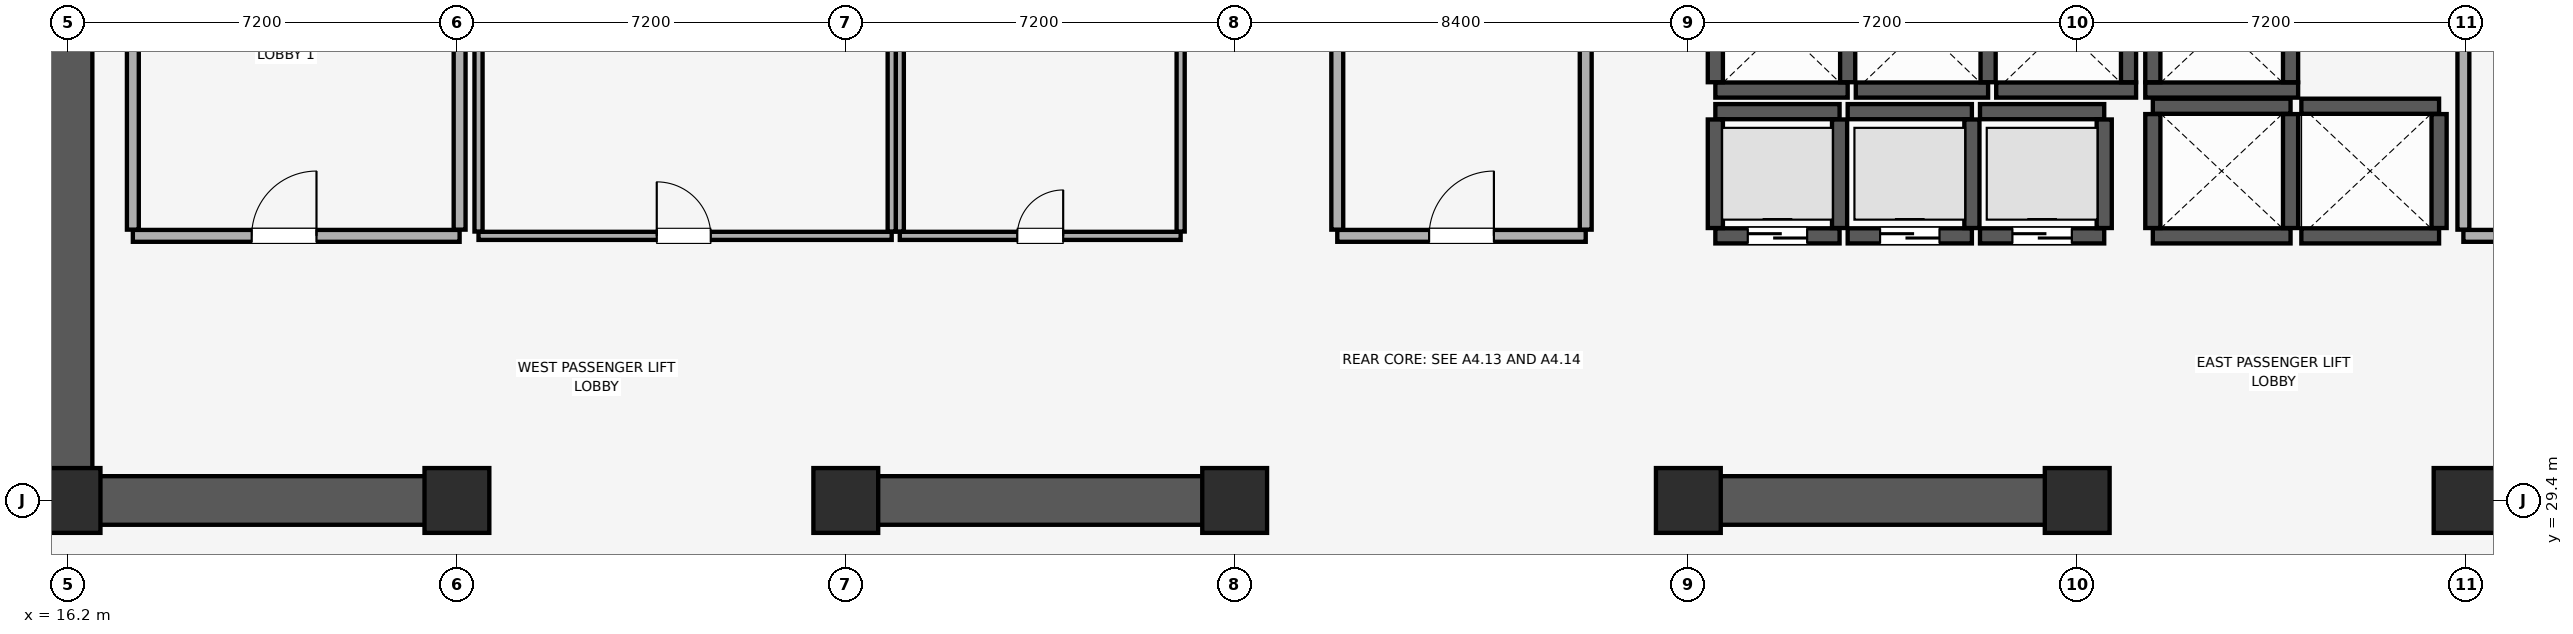
"""IFC4 building model, lengths in metres.
Left out: names, types, materials, properties, quantities, classifications, styles, units other than length and angle.
Written with IfcOpenShell. Run it as: python <this file> out.ifc"""

import sys

from ifc_helpers import new_model, si_unit, direction, frame, frame_2d, origin, origin_2d, place, context, subcontext, project, spatial, rectangle, extrude, element, fill, save


model = new_model("IFC4")
c1 = context("Model", 3, precision=1e-05, world=origin(), true_north=direction((0.0, 1.0)))
c2 = subcontext(c1, "Body", "Model", "MODEL_VIEW")
j1 = project(units=[si_unit("LENGTHUNIT", "METRE"), si_unit("PLANEANGLEUNIT", "RADIAN")], contexts=[c1])
p1 = place(None, origin())
s1 = spatial("IfcSite", under=j1, at=p1, CompositionType="ELEMENT")
p2 = place(p1, origin())
s2 = spatial("IfcBuilding", under=s1, at=p2, CompositionType="ELEMENT")
p3 = place(p2, frame((0.0, 0.0, 184.75)))
s3 = spatial("IfcBuildingStorey", under=s2, at=p3, CompositionType="ELEMENT", Elevation=184.75)
for number, where, z_axis, x_axis in (
    (1, (16.2, 29.4, 0.0), (0.0, 0.0, 1.0), (1.0, 0.0, 0.0)),
    (2, (23.4, 29.4, 0.0), (0.0, 0.0, 1.0), (1.0, 0.0, 0.0)),
    (3, (30.6, 29.4, 0.0), (0.0, 0.0, 1.0), (1.0, 0.0, 0.0)),
    (4, (37.8, 29.4, 0.0), (0.0, 0.0, 1.0), (1.0, 0.0, 0.0)),
    (5, (46.2, 29.4, 0.0), (0.0, 0.0, 1.0), (1.0, 0.0, 0.0)),
    (6, (53.4, 29.4, 0.0), (0.0, 0.0, 1.0), (1.0, 0.0, 0.0)),
    (7, (60.6, 29.4, 0.0), (0.0, 0.0, 1.0), (1.0, 0.0, 0.0)),
):
    element("IfcColumn", number, at=place(p3, frame(where, z_axis=z_axis, x_axis=x_axis)), inside=s3, PredefinedType="COLUMN", context=c2, shape_type="SweptSolid", body=[
        extrude(rectangle(XDim=1.2, YDim=1.2, at=origin_2d()), origin(), (0.0, 0.0, 1.0), 5.16),
    ])
p4 = place(p3, frame((16.2, 29.4, 0.0), z_axis=(0.0, 0.0, 1.0), x_axis=(0.0, 1.0, 0.0)))
e8 = element("IfcWall", 8, at=p4, inside=s3, PredefinedType="SHEAR", context=c2, shape_type="SweptSolid", body=[
    extrude(rectangle(XDim=19.2, YDim=0.9, at=frame_2d((9.6, 0.0))), origin(), (0.0, 0.0, 1.0), 5.16),
])
p5 = place(p3, frame((16.655, 29.4, 0.0), z_axis=(0.0, 0.0, 1.0), x_axis=(1.0, 0.0, 0.0)))
e9 = element("IfcWall", 9, at=p5, inside=s3, PredefinedType="SHEAR", context=c2, shape_type="SweptSolid", body=[
    extrude(rectangle(XDim=6.945, YDim=0.9, at=frame_2d((3.473, 0.0))), origin(), (0.0, 0.0, 1.0), 5.16),
])
for number, where, z_axis, x_axis in (
    (10, (30.4, 29.4, 0.0), (0.0, 0.0, 1.0), (1.0, 0.0, 0.0)),
    (11, (46.0, 29.4, 0.0), (0.0, 0.0, 1.0), (1.0, 0.0, 0.0)),
):
    element("IfcWall", number, at=place(p3, frame(where, z_axis=z_axis, x_axis=x_axis)), inside=s3, PredefinedType="SHEAR", context=c2, shape_type="SweptSolid", body=[
        extrude(rectangle(XDim=7.6, YDim=0.9, at=frame_2d((3.8, 0.0))), origin(), (0.0, 0.0, 1.0), 5.16),
    ])
p6 = place(p3, frame((60.4, 29.4, 0.0), z_axis=(0.0, 0.0, 1.0), x_axis=(1.0, 0.0, 0.0)))
e12 = element("IfcWall", 12, at=p6, inside=s3, PredefinedType="SHEAR", context=c2, shape_type="SweptSolid", body=[
    extrude(rectangle(XDim=6.945, YDim=0.9, at=frame_2d((3.473, 0.0))), origin(), (0.0, 0.0, 1.0), 5.16),
])
p7 = place(p3, frame((46.7, 34.3, 0.0), z_axis=(0.0, 0.0, 1.0), x_axis=(1.0, 0.0, 0.0)))
e13 = element("IfcWall", 13, at=p7, inside=s3, PredefinedType="SHEAR", context=c2, shape_type="SweptSolid", body=[
    extrude(rectangle(XDim=2.3, YDim=0.28, at=frame_2d((1.15, 0.0))), origin(), (0.0, 0.0, 1.0), 5.16),
])
p8 = place(p7, frame((0.6, 0.0, 0.0)))
e14 = element("IfcOpeningElement", 14, at=p8, cuts=e13, PredefinedType="OPENING", context=c2, shape_type="SweptSolid", body=[
    extrude(rectangle(XDim=1.1, YDim=2.2, at=frame_2d((0.55, 1.1))), frame((0.0, 0.15, 0.0), z_axis=(0.0, -1.0, 0.0), x_axis=(1.0, 0.0, 0.0)), (0.0, 0.0, 1.0), 0.3),
])
p9 = place(p3, frame((46.7, 36.6, 0.0), z_axis=(0.0, 0.0, 1.0), x_axis=(1.0, 0.0, 0.0)))
e15 = element("IfcWall", 15, at=p9, inside=s3, PredefinedType="SHEAR", context=c2, shape_type="SweptSolid", body=[
    extrude(rectangle(XDim=2.3, YDim=0.28, at=frame_2d((1.15, 0.0))), origin(), (0.0, 0.0, 1.0), 5.16),
])
for number, where, z_axis, x_axis in (
    (16, (46.7, 34.445, 0.0), (0.0, 0.0, 1.0), (0.0, 1.0, 0.0)),
    (17, (49.0, 34.445, 0.0), (0.0, 0.0, 1.0), (0.0, 1.0, 0.0)),
):
    element("IfcWall", number, at=place(p3, frame(where, z_axis=z_axis, x_axis=x_axis)), inside=s3, PredefinedType="SHEAR", context=c2, shape_type="SweptSolid", body=[
        extrude(rectangle(XDim=2.01, YDim=0.28, at=frame_2d((1.005, 0.0))), origin(), (0.0, 0.0, 1.0), 5.16),
    ])
p10 = place(p3, frame((49.15, 34.3, 0.0), z_axis=(0.0, 0.0, 1.0), x_axis=(1.0, 0.0, 0.0)))
e18 = element("IfcWall", 18, at=p10, inside=s3, PredefinedType="SHEAR", context=c2, shape_type="SweptSolid", body=[
    extrude(rectangle(XDim=2.3, YDim=0.28, at=frame_2d((1.15, 0.0))), origin(), (0.0, 0.0, 1.0), 5.16),
])
p11 = place(p10, frame((0.6, 0.0, 0.0)))
e19 = element("IfcOpeningElement", 19, at=p11, cuts=e18, PredefinedType="OPENING", context=c2, shape_type="SweptSolid", body=[
    extrude(rectangle(XDim=1.1, YDim=2.2, at=frame_2d((0.55, 1.1))), frame((0.0, 0.15, 0.0), z_axis=(0.0, -1.0, 0.0), x_axis=(1.0, 0.0, 0.0)), (0.0, 0.0, 1.0), 0.3),
])
p12 = place(p3, frame((49.15, 36.6, 0.0), z_axis=(0.0, 0.0, 1.0), x_axis=(1.0, 0.0, 0.0)))
e20 = element("IfcWall", 20, at=p12, inside=s3, PredefinedType="SHEAR", context=c2, shape_type="SweptSolid", body=[
    extrude(rectangle(XDim=2.3, YDim=0.28, at=frame_2d((1.15, 0.0))), origin(), (0.0, 0.0, 1.0), 5.16),
])
p13 = place(p3, frame((51.45, 34.445, 0.0), z_axis=(0.0, 0.0, 1.0), x_axis=(0.0, 1.0, 0.0)))
e21 = element("IfcWall", 21, at=p13, inside=s3, PredefinedType="SHEAR", context=c2, shape_type="SweptSolid", body=[
    extrude(rectangle(XDim=2.01, YDim=0.28, at=frame_2d((1.005, 0.0))), origin(), (0.0, 0.0, 1.0), 5.16),
])
p14 = place(p3, frame((51.6, 34.3, 0.0), z_axis=(0.0, 0.0, 1.0), x_axis=(1.0, 0.0, 0.0)))
e22 = element("IfcWall", 22, at=p14, inside=s3, PredefinedType="SHEAR", context=c2, shape_type="SweptSolid", body=[
    extrude(rectangle(XDim=2.3, YDim=0.28, at=frame_2d((1.15, 0.0))), origin(), (0.0, 0.0, 1.0), 5.16),
])
p15 = place(p14, frame((0.6, 0.0, 0.0)))
e23 = element("IfcOpeningElement", 23, at=p15, cuts=e22, PredefinedType="OPENING", context=c2, shape_type="SweptSolid", body=[
    extrude(rectangle(XDim=1.1, YDim=2.2, at=frame_2d((0.55, 1.1))), frame((0.0, 0.15, 0.0), z_axis=(0.0, -1.0, 0.0), x_axis=(1.0, 0.0, 0.0)), (0.0, 0.0, 1.0), 0.3),
])
p16 = place(p3, frame((51.6, 36.6, 0.0), z_axis=(0.0, 0.0, 1.0), x_axis=(1.0, 0.0, 0.0)))
e24 = element("IfcWall", 24, at=p16, inside=s3, PredefinedType="SHEAR", context=c2, shape_type="SweptSolid", body=[
    extrude(rectangle(XDim=2.3, YDim=0.28, at=frame_2d((1.15, 0.0))), origin(), (0.0, 0.0, 1.0), 5.16),
])
p17 = place(p3, frame((53.9, 34.445, 0.0), z_axis=(0.0, 0.0, 1.0), x_axis=(0.0, 1.0, 0.0)))
e25 = element("IfcWall", 25, at=p17, inside=s3, PredefinedType="SHEAR", context=c2, shape_type="SweptSolid", body=[
    extrude(rectangle(XDim=2.01, YDim=0.28, at=frame_2d((1.005, 0.0))), origin(), (0.0, 0.0, 1.0), 5.16),
])
p18 = place(p3, frame((46.7, 37.0, 0.0), z_axis=(0.0, 0.0, 1.0), x_axis=(1.0, 0.0, 0.0)))
e26 = element("IfcWall", 26, at=p18, inside=s3, PredefinedType="SHEAR", context=c2, shape_type="SweptSolid", body=[
    extrude(rectangle(XDim=2.45, YDim=0.28, at=frame_2d((1.225, 0.0))), origin(), (0.0, 0.0, 1.0), 5.16),
])
for number, where, z_axis, x_axis in (
    (27, (46.7, 37.145, 0.0), (0.0, 0.0, 1.0), (0.0, 1.0, 0.0)),
    (28, (49.15, 37.145, 0.0), (0.0, 0.0, 1.0), (0.0, 1.0, 0.0)),
):
    element("IfcWall", number, at=place(p3, frame(where, z_axis=z_axis, x_axis=x_axis)), inside=s3, PredefinedType="SHEAR", context=c2, shape_type="SweptSolid", body=[
        extrude(rectangle(XDim=2.06, YDim=0.28, at=frame_2d((1.03, 0.0))), origin(), (0.0, 0.0, 1.0), 5.16),
    ])
p19 = place(p3, frame((49.3, 37.0, 0.0), z_axis=(0.0, 0.0, 1.0), x_axis=(1.0, 0.0, 0.0)))
e29 = element("IfcWall", 29, at=p19, inside=s3, PredefinedType="SHEAR", context=c2, shape_type="SweptSolid", body=[
    extrude(rectangle(XDim=2.45, YDim=0.28, at=frame_2d((1.225, 0.0))), origin(), (0.0, 0.0, 1.0), 5.16),
])
p20 = place(p3, frame((51.75, 37.145, 0.0), z_axis=(0.0, 0.0, 1.0), x_axis=(0.0, 1.0, 0.0)))
e30 = element("IfcWall", 30, at=p20, inside=s3, PredefinedType="SHEAR", context=c2, shape_type="SweptSolid", body=[
    extrude(rectangle(XDim=2.06, YDim=0.28, at=frame_2d((1.03, 0.0))), origin(), (0.0, 0.0, 1.0), 5.16),
])
p21 = place(p3, frame((51.9, 37.0, 0.0), z_axis=(0.0, 0.0, 1.0), x_axis=(1.0, 0.0, 0.0)))
e31 = element("IfcWall", 31, at=p21, inside=s3, PredefinedType="SHEAR", context=c2, shape_type="SweptSolid", body=[
    extrude(rectangle(XDim=2.59, YDim=0.28, at=frame_2d((1.295, 0.0))), origin(), (0.0, 0.0, 1.0), 5.16),
])
p22 = place(p3, frame((54.35, 37.145, 0.0), z_axis=(0.0, 0.0, 1.0), x_axis=(0.0, 1.0, 0.0)))
e32 = element("IfcWall", 32, at=p22, inside=s3, PredefinedType="SHEAR", context=c2, shape_type="SweptSolid", body=[
    extrude(rectangle(XDim=2.06, YDim=0.28, at=frame_2d((1.03, 0.0))), origin(), (0.0, 0.0, 1.0), 5.16),
])
for number, where, z_axis, x_axis in (
    (33, (54.8, 34.3, 0.0), (0.0, 0.0, 1.0), (1.0, 0.0, 0.0)),
    (34, (54.8, 36.7, 0.0), (0.0, 0.0, 1.0), (1.0, 0.0, 0.0)),
):
    element("IfcWall", number, at=place(p3, frame(where, z_axis=z_axis, x_axis=x_axis)), inside=s3, PredefinedType="SHEAR", context=c2, shape_type="SweptSolid", body=[
        extrude(rectangle(XDim=2.55, YDim=0.28, at=frame_2d((1.275, 0.0))), origin(), (0.0, 0.0, 1.0), 5.16),
    ])
for number, where, z_axis, x_axis in (
    (35, (54.8, 34.445, 0.0), (0.0, 0.0, 1.0), (0.0, 1.0, 0.0)),
    (36, (57.35, 34.445, 0.0), (0.0, 0.0, 1.0), (0.0, 1.0, 0.0)),
):
    element("IfcWall", number, at=place(p3, frame(where, z_axis=z_axis, x_axis=x_axis)), inside=s3, PredefinedType="SHEAR", context=c2, shape_type="SweptSolid", body=[
        extrude(rectangle(XDim=2.11, YDim=0.28, at=frame_2d((1.055, 0.0))), origin(), (0.0, 0.0, 1.0), 5.16),
    ])
for number, where, z_axis, x_axis in (
    (37, (57.55, 34.3, 0.0), (0.0, 0.0, 1.0), (1.0, 0.0, 0.0)),
    (38, (57.55, 36.7, 0.0), (0.0, 0.0, 1.0), (1.0, 0.0, 0.0)),
):
    element("IfcWall", number, at=place(p3, frame(where, z_axis=z_axis, x_axis=x_axis)), inside=s3, PredefinedType="SHEAR", context=c2, shape_type="SweptSolid", body=[
        extrude(rectangle(XDim=2.55, YDim=0.28, at=frame_2d((1.275, 0.0))), origin(), (0.0, 0.0, 1.0), 5.16),
    ])
p23 = place(p3, frame((60.1, 34.445, 0.0), z_axis=(0.0, 0.0, 1.0), x_axis=(0.0, 1.0, 0.0)))
e39 = element("IfcWall", 39, at=p23, inside=s3, PredefinedType="SHEAR", context=c2, shape_type="SweptSolid", body=[
    extrude(rectangle(XDim=2.11, YDim=0.28, at=frame_2d((1.055, 0.0))), origin(), (0.0, 0.0, 1.0), 5.16),
])
p24 = place(p3, frame((54.66, 37.0, 0.0), z_axis=(0.0, 0.0, 1.0), x_axis=(1.0, 0.0, 0.0)))
e40 = element("IfcWall", 40, at=p24, inside=s3, PredefinedType="SHEAR", context=c2, shape_type="SweptSolid", body=[
    extrude(rectangle(XDim=2.83, YDim=0.28, at=frame_2d((1.415, 0.0))), origin(), (0.0, 0.0, 1.0), 5.16),
])
for number, where, z_axis, x_axis in (
    (41, (54.8, 37.145, 0.0), (0.0, 0.0, 1.0), (0.0, 1.0, 0.0)),
    (42, (57.35, 37.145, 0.0), (0.0, 0.0, 1.0), (0.0, 1.0, 0.0)),
):
    element("IfcWall", number, at=place(p3, frame(where, z_axis=z_axis, x_axis=x_axis)), inside=s3, PredefinedType="SHEAR", context=c2, shape_type="SweptSolid", body=[
        extrude(rectangle(XDim=2.11, YDim=0.28, at=frame_2d((1.055, 0.0))), origin(), (0.0, 0.0, 1.0), 5.16),
    ])
p25 = place(p3, frame((17.4, 34.3, 0.0), z_axis=(0.0, 0.0, 1.0), x_axis=(1.0, 0.0, 0.0)))
e43 = element("IfcWall", 43, at=p25, inside=s3, PredefinedType="PARTITIONING", context=c2, shape_type="SweptSolid", body=[
    extrude(rectangle(XDim=6.05, YDim=0.22, at=frame_2d((3.025, 0.0))), origin(), (0.0, 0.0, 1.0), 5.16),
])
p26 = place(p25, frame((2.2, 0.0, 0.0)))
e44 = element("IfcOpeningElement", 44, at=p26, cuts=e43, PredefinedType="OPENING", context=c2, shape_type="SweptSolid", body=[
    extrude(rectangle(XDim=1.2, YDim=2.15, at=frame_2d((0.6, 1.075))), frame((0.0, 0.12, 0.0), z_axis=(0.0, -1.0, 0.0), x_axis=(1.0, 0.0, 0.0)), (0.0, 0.0, 1.0), 0.24),
])
p27 = place(p3, frame((17.4, 34.415, 0.0), z_axis=(0.0, 0.0, 1.0), x_axis=(0.0, 1.0, 0.0)))
e45 = element("IfcWall", 45, at=p27, inside=s3, PredefinedType="PARTITIONING", context=c2, shape_type="SweptSolid", body=[
    extrude(rectangle(XDim=5.43, YDim=0.22, at=frame_2d((2.715, 0.0))), origin(), (0.0, 0.0, 1.0), 5.16),
])
p28 = place(p3, frame((23.45, 34.415, 0.0), z_axis=(0.0, 0.0, 1.0), x_axis=(0.0, 1.0, 0.0)))
e46 = element("IfcWall", 46, at=p28, inside=s3, PredefinedType="PARTITIONING", context=c2, shape_type="SweptSolid", body=[
    extrude(rectangle(XDim=5.64, YDim=0.22, at=frame_2d((2.82, 0.0))), origin(), (0.0, 0.0, 1.0), 5.16),
])
p29 = place(p3, frame((60.55, 34.3, 0.0), z_axis=(0.0, 0.0, 1.0), x_axis=(1.0, 0.0, 0.0)))
e47 = element("IfcWall", 47, at=p29, inside=s3, PredefinedType="PARTITIONING", context=c2, shape_type="SweptSolid", body=[
    extrude(rectangle(XDim=6.05, YDim=0.22, at=frame_2d((3.025, 0.0))), origin(), (0.0, 0.0, 1.0), 5.16),
])
p30 = place(p29, frame((2.65, 0.0, 0.0)))
e48 = element("IfcOpeningElement", 48, at=p30, cuts=e47, PredefinedType="OPENING", context=c2, shape_type="SweptSolid", body=[
    extrude(rectangle(XDim=1.2, YDim=2.15, at=frame_2d((0.6, 1.075))), frame((0.0, 0.12, 0.0), z_axis=(0.0, -1.0, 0.0), x_axis=(1.0, 0.0, 0.0)), (0.0, 0.0, 1.0), 0.24),
])
p31 = place(p3, frame((60.55, 34.415, 0.0), z_axis=(0.0, 0.0, 1.0), x_axis=(0.0, 1.0, 0.0)))
e49 = element("IfcWall", 49, at=p31, inside=s3, PredefinedType="PARTITIONING", context=c2, shape_type="SweptSolid", body=[
    extrude(rectangle(XDim=5.64, YDim=0.22, at=frame_2d((2.82, 0.0))), origin(), (0.0, 0.0, 1.0), 5.16),
])
p32 = place(p3, frame((39.7, 34.3, 0.0), z_axis=(0.0, 0.0, 1.0), x_axis=(1.0, 0.0, 0.0)))
e50 = element("IfcWall", 50, at=p32, inside=s3, PredefinedType="PARTITIONING", context=c2, shape_type="SweptSolid", body=[
    extrude(rectangle(XDim=4.6, YDim=0.22, at=frame_2d((2.3, 0.0))), origin(), (0.0, 0.0, 1.0), 5.16),
])
p33 = place(p32, frame((1.7, 0.0, 0.0)))
e51 = element("IfcOpeningElement", 51, at=p33, cuts=e50, PredefinedType="OPENING", context=c2, shape_type="SweptSolid", body=[
    extrude(rectangle(XDim=1.2, YDim=2.15, at=frame_2d((0.6, 1.075))), frame((0.0, 0.12, 0.0), z_axis=(0.0, -1.0, 0.0), x_axis=(1.0, 0.0, 0.0)), (0.0, 0.0, 1.0), 0.24),
])
for number, where, z_axis, x_axis in (
    (52, (39.7, 34.415, 0.0), (0.0, 0.0, 1.0), (0.0, 1.0, 0.0)),
    (53, (44.3, 34.415, 0.0), (0.0, 0.0, 1.0), (0.0, 1.0, 0.0)),
):
    element("IfcWall", number, at=place(p3, frame(where, z_axis=z_axis, x_axis=x_axis)), inside=s3, PredefinedType="PARTITIONING", context=c2, shape_type="SweptSolid", body=[
        extrude(rectangle(XDim=5.785, YDim=0.22, at=frame_2d((2.893, 0.0))), origin(), (0.0, 0.0, 1.0), 5.16),
    ])
p34 = place(p3, frame((31.6, 34.3, 0.0), z_axis=(0.0, 0.0, 1.0), x_axis=(1.0, 0.0, 0.0)))
e54 = element("IfcWall", 54, at=p34, inside=s3, PredefinedType="PARTITIONING", context=c2, shape_type="SweptSolid", body=[
    extrude(rectangle(XDim=5.2, YDim=0.15, at=frame_2d((2.6, 0.0))), origin(), (0.0, 0.0, 1.0), 5.16),
])
p35 = place(p34, frame((2.175, 0.0, 0.0)))
e55 = element("IfcOpeningElement", 55, at=p35, cuts=e54, PredefinedType="OPENING", context=c2, shape_type="SweptSolid", body=[
    extrude(rectangle(XDim=0.85, YDim=2.1, at=frame_2d((0.425, 1.05))), frame((0.0, 0.085, 0.0), z_axis=(0.0, -1.0, 0.0), x_axis=(1.0, 0.0, 0.0)), (0.0, 0.0, 1.0), 0.17),
])
for number, where, z_axis, x_axis in (
    (56, (31.6, 34.38, 0.0), (0.0, 0.0, 1.0), (0.0, 1.0, 0.0)),
    (57, (36.8, 34.38, 0.0), (0.0, 0.0, 1.0), (0.0, 1.0, 0.0)),
):
    element("IfcWall", number, at=place(p3, frame(where, z_axis=z_axis, x_axis=x_axis)), inside=s3, PredefinedType="PARTITIONING", context=c2, shape_type="SweptSolid", body=[
        extrude(rectangle(XDim=4.94, YDim=0.15, at=frame_2d((2.47, 0.0))), origin(), (0.0, 0.0, 1.0), 5.16),
    ])
p36 = place(p3, frame((23.8, 34.3, 0.0), z_axis=(0.0, 0.0, 1.0), x_axis=(1.0, 0.0, 0.0)))
e58 = element("IfcWall", 58, at=p36, inside=s3, PredefinedType="PARTITIONING", context=c2, shape_type="SweptSolid", body=[
    extrude(rectangle(XDim=7.65, YDim=0.15, at=frame_2d((3.825, 0.0))), origin(), (0.0, 0.0, 1.0), 5.16),
])
p37 = place(p36, frame((3.3, 0.0, 0.0)))
e59 = element("IfcOpeningElement", 59, at=p37, cuts=e58, PredefinedType="OPENING", context=c2, shape_type="SweptSolid", body=[
    extrude(rectangle(XDim=1.0, YDim=2.15, at=frame_2d((0.5, 1.075))), frame((0.0, 0.085, 0.0), z_axis=(0.0, -1.0, 0.0), x_axis=(1.0, 0.0, 0.0)), (0.0, 0.0, 1.0), 0.17),
])
for number, where, z_axis, x_axis in (
    (60, (23.8, 34.38, 0.0), (0.0, 0.0, 1.0), (0.0, 1.0, 0.0)),
    (61, (31.45, 34.38, 0.0), (0.0, 0.0, 1.0), (0.0, 1.0, 0.0)),
):
    element("IfcWall", number, at=place(p3, frame(where, z_axis=z_axis, x_axis=x_axis)), inside=s3, PredefinedType="PARTITIONING", context=c2, shape_type="SweptSolid", body=[
        extrude(rectangle(XDim=4.94, YDim=0.15, at=frame_2d((2.47, 0.0))), origin(), (0.0, 0.0, 1.0), 5.16),
    ])
p38 = place(p8, origin())
e62 = element("IfcDoor", 62, at=p38, inside=s3, OperationType="DOUBLE_DOOR_SLIDING", PredefinedType="DOOR", context=c2, shape_type="SweptSolid", body=[
    extrude(rectangle(XDim=1.1, YDim=2.2, at=frame_2d((0.55, 1.1))), frame((0.0, 0.025, 0.0), z_axis=(0.0, -1.0, 0.0), x_axis=(1.0, 0.0, 0.0)), (0.0, 0.0, 1.0), 0.05),
])
fill(e14, e62)
p39 = place(p11, origin())
e63 = element("IfcDoor", 63, at=p39, inside=s3, OperationType="DOUBLE_DOOR_SLIDING", PredefinedType="DOOR", context=c2, shape_type="SweptSolid", body=[
    extrude(rectangle(XDim=1.1, YDim=2.2, at=frame_2d((0.55, 1.1))), frame((0.0, 0.025, 0.0), z_axis=(0.0, -1.0, 0.0), x_axis=(1.0, 0.0, 0.0)), (0.0, 0.0, 1.0), 0.05),
])
fill(e19, e63)
p40 = place(p15, origin())
e64 = element("IfcDoor", 64, at=p40, inside=s3, OperationType="DOUBLE_DOOR_SLIDING", PredefinedType="DOOR", context=c2, shape_type="SweptSolid", body=[
    extrude(rectangle(XDim=1.1, YDim=2.2, at=frame_2d((0.55, 1.1))), frame((0.0, 0.025, 0.0), z_axis=(0.0, -1.0, 0.0), x_axis=(1.0, 0.0, 0.0)), (0.0, 0.0, 1.0), 0.05),
])
fill(e23, e64)
p41 = place(p26, origin())
e65 = element("IfcDoor", 65, at=p41, inside=s3, OperationType="SINGLE_SWING_RIGHT", PredefinedType="DOOR", context=c2, shape_type="SweptSolid", body=[
    extrude(rectangle(XDim=1.2, YDim=2.15, at=frame_2d((0.6, 1.075))), frame((0.0, 0.025, 0.0), z_axis=(0.0, -1.0, 0.0), x_axis=(1.0, 0.0, 0.0)), (0.0, 0.0, 1.0), 0.05),
])
fill(e44, e65)
p42 = place(p33, origin())
e66 = element("IfcDoor", 66, at=p42, inside=s3, OperationType="SINGLE_SWING_RIGHT", PredefinedType="DOOR", context=c2, shape_type="SweptSolid", body=[
    extrude(rectangle(XDim=1.2, YDim=2.15, at=frame_2d((0.6, 1.075))), frame((0.0, 0.025, 0.0), z_axis=(0.0, -1.0, 0.0), x_axis=(1.0, 0.0, 0.0)), (0.0, 0.0, 1.0), 0.05),
])
fill(e51, e66)
p43 = place(p35, origin())
e67 = element("IfcDoor", 67, at=p43, inside=s3, OperationType="SINGLE_SWING_RIGHT", PredefinedType="DOOR", context=c2, shape_type="SweptSolid", body=[
    extrude(rectangle(XDim=0.85, YDim=2.1, at=frame_2d((0.425, 1.05))), frame((0.0, 0.025, 0.0), z_axis=(0.0, -1.0, 0.0), x_axis=(1.0, 0.0, 0.0)), (0.0, 0.0, 1.0), 0.05),
])
fill(e55, e67)
p44 = place(p37, origin())
e68 = element("IfcDoor", 68, at=p44, inside=s3, OperationType="SINGLE_SWING_LEFT", PredefinedType="DOOR", context=c2, shape_type="SweptSolid", body=[
    extrude(rectangle(XDim=1.0, YDim=2.15, at=frame_2d((0.5, 1.075))), frame((0.0, 0.025, 0.0), z_axis=(0.0, -1.0, 0.0), x_axis=(1.0, 0.0, 0.0)), (0.0, 0.0, 1.0), 0.05),
])
fill(e59, e68)
save(model, sys.argv[1])
